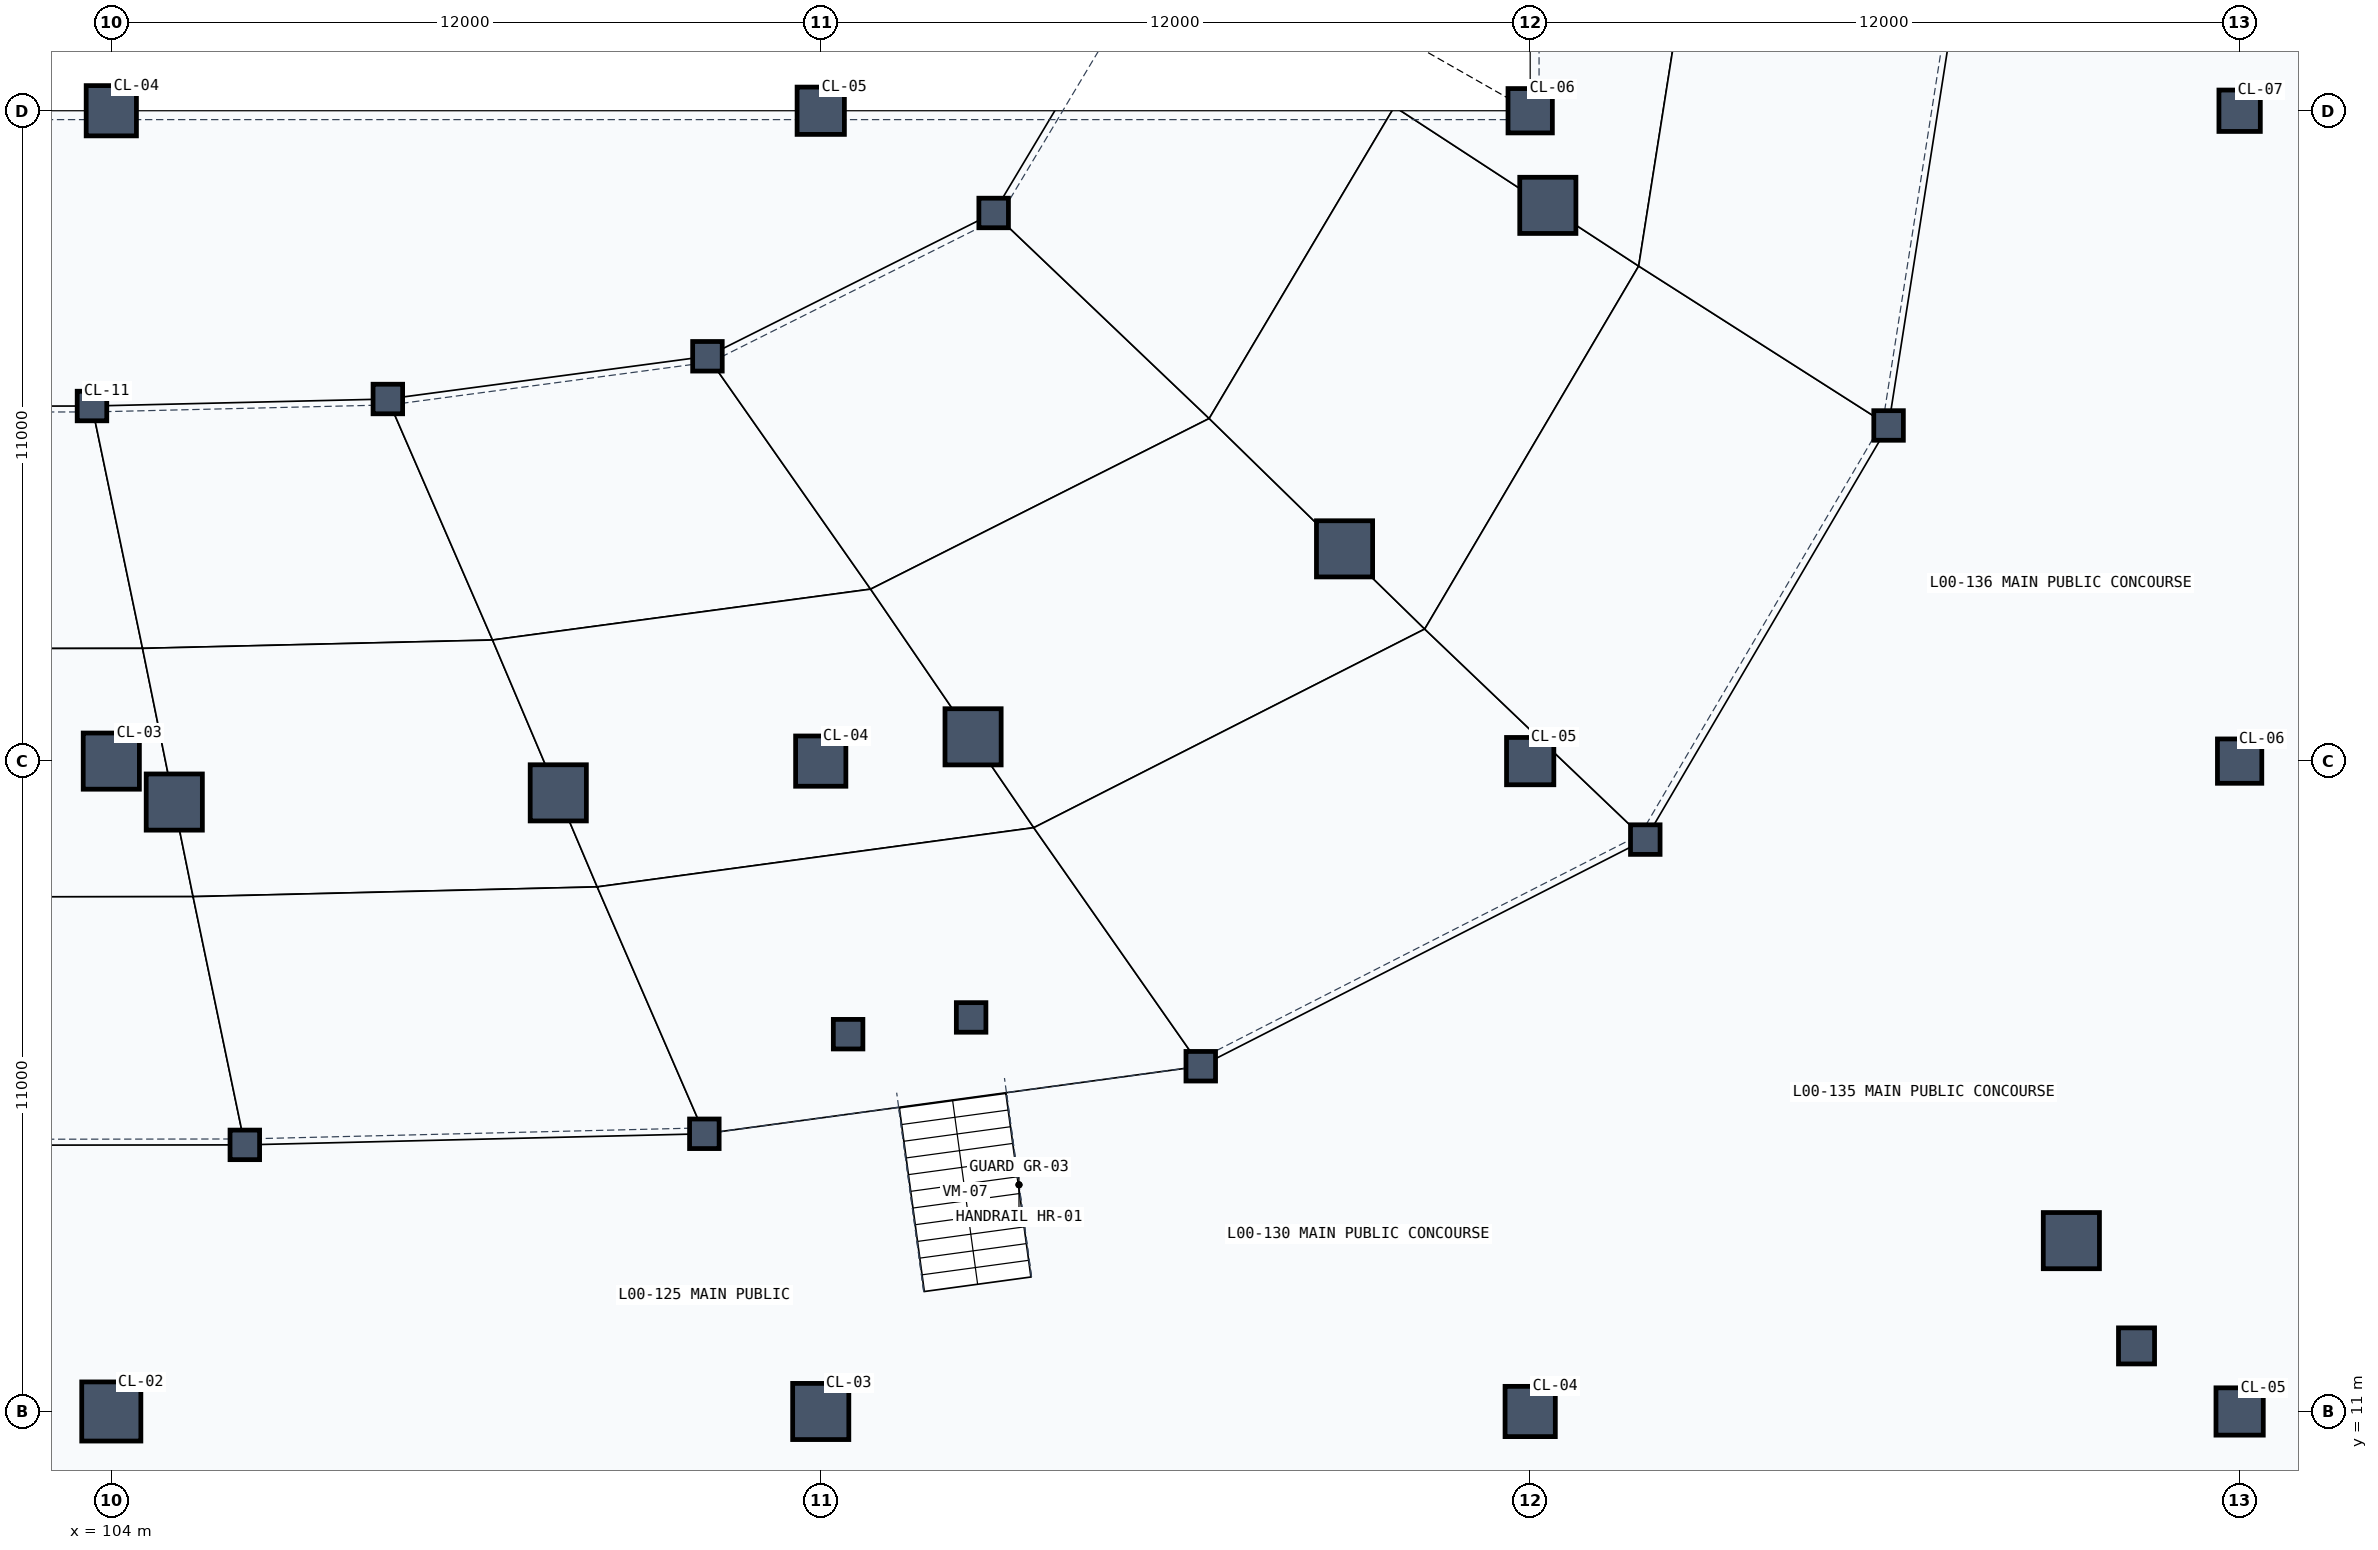
"""IFC4 building model, lengths in metres.
Left out: names, types, materials, properties, quantities, classifications, styles, units other than length and angle.
Written with IfcOpenShell. Run it as: python <this file> out.ifc"""

import sys

from ifc_helpers import new_model, si_unit, direction, frame, origin, origin_2d, place, context, subcontext, project, spatial, rectangle, hollow_circle, extrude, element, save


model = new_model("IFC4")
c1 = context("Model", 3, precision=1e-05, world=origin(), true_north=direction((0.0, 1.0)))
c2 = subcontext(c1, "Body", "Model", "MODEL_VIEW")
j1 = project(units=[si_unit("LENGTHUNIT", "METRE"), si_unit("PLANEANGLEUNIT", "RADIAN")], contexts=[c1])
p1 = place(None, origin())
s1 = spatial("IfcSite", under=j1, at=p1, CompositionType="ELEMENT")
p2 = place(p1, origin())
s2 = spatial("IfcBuilding", under=s1, at=p2, CompositionType="ELEMENT")
p3 = place(p2, origin())
s3 = spatial("IfcBuildingStorey", under=s2, at=p3, CompositionType="ELEMENT", Elevation=0.0)
p4 = place(p3, frame((104.0, 11.0, 0.0), z_axis=(0.0, 0.0, 1.0), x_axis=(1.0, 0.0, 0.0)))
e1 = element("IfcColumn", 1, at=p4, inside=s3, PredefinedType="COLUMN", context=c2, shape_type="SweptSolid", body=[
    extrude(rectangle(XDim=1.0, YDim=1.0, at=origin_2d()), origin(), (0.0, 0.0, 1.0), 5.4),
])
p5 = place(p3, frame((104.0, 22.0, 0.0), z_axis=(0.0, 0.0, 1.0), x_axis=(1.0, 0.0, 0.0)))
e2 = element("IfcColumn", 2, at=p5, inside=s3, PredefinedType="COLUMN", context=c2, shape_type="SweptSolid", body=[
    extrude(rectangle(XDim=0.95, YDim=0.95, at=origin_2d()), origin(), (0.0, 0.0, 1.0), 5.4),
])
p6 = place(p3, frame((104.0, 33.0, 0.0), z_axis=(0.0, 0.0, 1.0), x_axis=(1.0, 0.0, 0.0)))
e3 = element("IfcColumn", 3, at=p6, inside=s3, PredefinedType="COLUMN", context=c2, shape_type="SweptSolid", body=[
    extrude(rectangle(XDim=0.85, YDim=0.85, at=origin_2d()), origin(), (0.0, 0.0, 1.0), 5.4),
])
p7 = place(p3, frame((116.0, 11.0, 0.0), z_axis=(0.0, 0.0, 1.0), x_axis=(1.0, 0.0, 0.0)))
e4 = element("IfcColumn", 4, at=p7, inside=s3, PredefinedType="COLUMN", context=c2, shape_type="SweptSolid", body=[
    extrude(rectangle(XDim=0.95, YDim=0.95, at=origin_2d()), origin(), (0.0, 0.0, 1.0), 5.4),
])
p8 = place(p3, frame((116.0, 22.0, 0.0), z_axis=(0.0, 0.0, 1.0), x_axis=(1.0, 0.0, 0.0)))
e5 = element("IfcColumn", 5, at=p8, inside=s3, PredefinedType="COLUMN", context=c2, shape_type="SweptSolid", body=[
    extrude(rectangle(XDim=0.85, YDim=0.85, at=origin_2d()), origin(), (0.0, 0.0, 1.0), 5.4),
])
p9 = place(p3, frame((116.0, 33.0, 0.0), z_axis=(0.0, 0.0, 1.0), x_axis=(1.0, 0.0, 0.0)))
e6 = element("IfcColumn", 6, at=p9, inside=s3, PredefinedType="COLUMN", context=c2, shape_type="SweptSolid", body=[
    extrude(rectangle(XDim=0.8, YDim=0.8, at=origin_2d()), origin(), (0.0, 0.0, 1.0), 5.4),
])
p10 = place(p3, frame((128.0, 11.0, 0.0), z_axis=(0.0, 0.0, 1.0), x_axis=(1.0, 0.0, 0.0)))
e7 = element("IfcColumn", 7, at=p10, inside=s3, PredefinedType="COLUMN", context=c2, shape_type="SweptSolid", body=[
    extrude(rectangle(XDim=0.85, YDim=0.85, at=origin_2d()), origin(), (0.0, 0.0, 1.0), 5.4),
])
p11 = place(p3, frame((128.0, 22.0, 0.0), z_axis=(0.0, 0.0, 1.0), x_axis=(1.0, 0.0, 0.0)))
e8 = element("IfcColumn", 8, at=p11, inside=s3, PredefinedType="COLUMN", context=c2, shape_type="SweptSolid", body=[
    extrude(rectangle(XDim=0.8, YDim=0.8, at=origin_2d()), origin(), (0.0, 0.0, 1.0), 5.4),
])
p12 = place(p3, frame((128.0, 33.0, 0.0), z_axis=(0.0, 0.0, 1.0), x_axis=(1.0, 0.0, 0.0)))
e9 = element("IfcColumn", 9, at=p12, inside=s3, PredefinedType="COLUMN", context=c2, shape_type="SweptSolid", body=[
    extrude(rectangle(XDim=0.75, YDim=0.75, at=origin_2d()), origin(), (0.0, 0.0, 1.0), 5.4),
])
p13 = place(p3, frame((140.0, 11.0, 0.0), z_axis=(0.0, 0.0, 1.0), x_axis=(1.0, 0.0, 0.0)))
e10 = element("IfcColumn", 10, at=p13, inside=s3, PredefinedType="COLUMN", context=c2, shape_type="SweptSolid", body=[
    extrude(rectangle(XDim=0.8, YDim=0.8, at=origin_2d()), origin(), (0.0, 0.0, 1.0), 5.4),
])
p14 = place(p3, frame((140.0, 22.0, 0.0), z_axis=(0.0, 0.0, 1.0), x_axis=(1.0, 0.0, 0.0)))
e11 = element("IfcColumn", 11, at=p14, inside=s3, PredefinedType="COLUMN", context=c2, shape_type="SweptSolid", body=[
    extrude(rectangle(XDim=0.75, YDim=0.75, at=origin_2d()), origin(), (0.0, 0.0, 1.0), 5.4),
])
p15 = place(p3, frame((140.0, 33.0, 0.0), z_axis=(0.0, 0.0, 1.0), x_axis=(1.0, 0.0, 0.0)))
e12 = element("IfcColumn", 12, at=p15, inside=s3, PredefinedType="COLUMN", context=c2, shape_type="SweptSolid", body=[
    extrude(rectangle(XDim=0.7, YDim=0.7, at=origin_2d()), origin(), (0.0, 0.0, 1.0), 5.4),
])
p16 = place(p3, frame((138.256, 12.109, 0.0), z_axis=(0.0, 0.0, 1.0), x_axis=(1.0, 0.0, 0.0)))
e13 = element("IfcColumn", 13, at=p16, inside=s3, PredefinedType="COLUMN", context=c2, shape_type="SweptSolid", body=[
    extrude(hollow_circle(Radius=0.305, WallThickness=0.025, at=origin_2d()), origin(), (0.0, 0.0, 1.0), 5.4),
])
for number, where, z_axis, x_axis in (
    (14, (105.065, 21.308, 0.0), (0.0, 0.0, 1.0), (1.0, 0.0, 0.0)),
    (15, (111.56, 21.463, 0.0), (0.0, 0.0, 1.0), (1.0, 0.0, 0.0)),
    (16, (118.577, 22.411, 0.0), (0.0, 0.0, 1.0), (1.0, 0.0, 0.0)),
    (17, (124.86, 25.59, 0.0), (0.0, 0.0, 1.0), (1.0, 0.0, 0.0)),
    (18, (128.299, 31.4, 0.0), (0.0, 0.0, 1.0), (1.0, 0.0, 0.0)),
    (19, (137.154, 13.89, 0.0), (0.0, 0.0, 1.0), (1.0, 0.0, 0.0)),
):
    element("IfcColumn", number, at=place(p3, frame(where, z_axis=z_axis, x_axis=x_axis)), inside=s3, PredefinedType="COLUMN", context=c2, shape_type="SweptSolid", body=[
        extrude(rectangle(XDim=0.95, YDim=0.95, at=origin_2d()), origin(), (0.0, 0.0, 1.0), 5.4),
    ])
p17 = place(p3, frame((103.673, 28.006, 0.0), z_axis=(0.0, 0.0, 1.0), x_axis=(1.0, 0.0, 0.0)))
e20 = element("IfcColumn", 20, at=p17, inside=s3, PredefinedType="COLUMN", context=c2, shape_type="SweptSolid", body=[
    extrude(rectangle(XDim=0.5, YDim=0.5, at=origin_2d()), origin(), (0.0, 0.0, 1.0), 0.55),
])
p18 = place(p3, frame((106.258, 15.509, 0.0), z_axis=(0.0, 0.0, 1.0), x_axis=(1.0, 0.0, 0.0)))
e21 = element("IfcColumn", 21, at=p18, inside=s3, PredefinedType="COLUMN", context=c2, shape_type="SweptSolid", body=[
    extrude(rectangle(XDim=0.5, YDim=0.5, at=origin_2d()), origin(), (0.0, 0.0, 1.0), 1.28),
])
p19 = place(p3, frame((108.678, 28.125, 0.0), z_axis=(0.0, 0.0, 1.0), x_axis=(1.0, 0.0, 0.0)))
e22 = element("IfcColumn", 22, at=p19, inside=s3, PredefinedType="COLUMN", context=c2, shape_type="SweptSolid", body=[
    extrude(rectangle(XDim=0.5, YDim=0.5, at=origin_2d()), origin(), (0.0, 0.0, 1.0), 0.55),
])
p20 = place(p3, frame((114.031, 15.697, 0.0), z_axis=(0.0, 0.0, 1.0), x_axis=(1.0, 0.0, 0.0)))
e23 = element("IfcColumn", 23, at=p20, inside=s3, PredefinedType="COLUMN", context=c2, shape_type="SweptSolid", body=[
    extrude(rectangle(XDim=0.5, YDim=0.5, at=origin_2d()), origin(), (0.0, 0.0, 1.0), 1.28),
])
for number, where, z_axis, x_axis in (
    (24, (116.463, 17.382, 0.0), (0.0, 0.0, 1.0), (1.0, 0.0, 0.0)),
    (25, (118.544, 17.665, 0.0), (0.0, 0.0, 1.0), (1.0, 0.0, 0.0)),
):
    element("IfcColumn", number, at=place(p3, frame(where, z_axis=z_axis, x_axis=x_axis)), inside=s3, PredefinedType="COLUMN", context=c2, shape_type="SweptSolid", body=[
        extrude(rectangle(XDim=0.5, YDim=0.5, at=origin_2d()), origin(), (0.0, 0.0, 1.0), 1.05),
    ])
p21 = place(p3, frame((114.083, 28.847, 0.0), z_axis=(0.0, 0.0, 1.0), x_axis=(1.0, 0.0, 0.0)))
e26 = element("IfcColumn", 26, at=p21, inside=s3, PredefinedType="COLUMN", context=c2, shape_type="SweptSolid", body=[
    extrude(rectangle(XDim=0.5, YDim=0.5, at=origin_2d()), origin(), (0.0, 0.0, 1.0), 0.55),
])
p22 = place(p3, frame((122.428, 16.839, 0.0), z_axis=(0.0, 0.0, 1.0), x_axis=(1.0, 0.0, 0.0)))
e27 = element("IfcColumn", 27, at=p22, inside=s3, PredefinedType="COLUMN", context=c2, shape_type="SweptSolid", body=[
    extrude(rectangle(XDim=0.5, YDim=0.5, at=origin_2d()), origin(), (0.0, 0.0, 1.0), 1.28),
])
p23 = place(p3, frame((118.925, 31.271, 0.0), z_axis=(0.0, 0.0, 1.0), x_axis=(1.0, 0.0, 0.0)))
e28 = element("IfcColumn", 28, at=p23, inside=s3, PredefinedType="COLUMN", context=c2, shape_type="SweptSolid", body=[
    extrude(rectangle(XDim=0.5, YDim=0.5, at=origin_2d()), origin(), (0.0, 0.0, 1.0), 0.55),
])
for number, where, z_axis, x_axis in (
    (29, (129.947, 20.673, 0.0), (0.0, 0.0, 1.0), (1.0, 0.0, 0.0)),
    (30, (134.062, 27.677, 0.0), (0.0, 0.0, 1.0), (1.0, 0.0, 0.0)),
):
    element("IfcColumn", number, at=place(p3, frame(where, z_axis=z_axis, x_axis=x_axis)), inside=s3, PredefinedType="COLUMN", context=c2, shape_type="SweptSolid", body=[
        extrude(rectangle(XDim=0.5, YDim=0.5, at=origin_2d()), origin(), (0.0, 0.0, 1.0), 1.28),
    ])
save(model, sys.argv[1])
